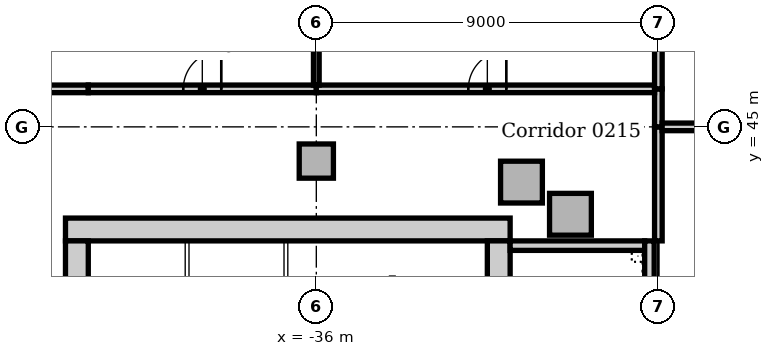
"""IFC4 building model, lengths in metres.
Left out: names, types, materials, properties, quantities, classifications, styles, units other than length and angle.
Written with IfcOpenShell. Run it as: python <this file> out.ifc"""

import sys

from ifc_helpers import new_model, si_unit, direction, frame, frame_2d, origin, origin_2d, place, context, subcontext, project, spatial, rectangle, extrude, element, fill, save


model = new_model("IFC4")
c1 = context("Model", 3, precision=1e-05, world=origin(), true_north=direction((0.0, 1.0)))
c2 = subcontext(c1, "Body", "Model", "MODEL_VIEW")
j1 = project(units=[si_unit("LENGTHUNIT", "METRE"), si_unit("PLANEANGLEUNIT", "RADIAN")], contexts=[c1])
p1 = place(None, origin())
s1 = spatial("IfcSite", under=j1, at=p1, CompositionType="ELEMENT")
p2 = place(p1, origin())
s2 = spatial("IfcBuilding", under=s1, at=p2, CompositionType="ELEMENT")
p3 = place(p2, frame((0.0, 0.0, 11.0)))
s3 = spatial("IfcBuildingStorey", under=s2, at=p3, CompositionType="ELEMENT", Elevation=11.0)
p4 = place(p3, frame((-30.9, 42.3, 0.0), z_axis=(0.0, 0.0, 1.0), x_axis=(-1.0, 0.0, 0.0)))
e1 = element("IfcWall", 1, at=p4, inside=s3, PredefinedType="SOLIDWALL", context=c2, shape_type="SweptSolid", body=[
    extrude(rectangle(XDim=11.7, YDim=0.6, at=frame_2d((5.85, 0.0))), origin(), (0.0, 0.0, 1.0), 5.0),
])
p5 = place(p3, frame((-31.2, 30.5, 0.0), z_axis=(0.0, 0.0, 1.0), x_axis=(0.0, 1.0, 0.0)))
e2 = element("IfcWall", 2, at=p5, inside=s3, PredefinedType="SOLIDWALL", context=c2, shape_type="SweptSolid", body=[
    extrude(rectangle(XDim=11.5, YDim=0.6, at=frame_2d((5.75, 0.0))), origin(), (0.0, 0.0, 1.0), 5.0),
])
p6 = place(p5, frame((0.85, 0.0, 0.0)))
e3 = element("IfcOpeningElement", 3, at=p6, cuts=e2, PredefinedType="OPENING", context=c2, shape_type="SweptSolid", body=[
    extrude(rectangle(XDim=1.8, YDim=2.1, at=frame_2d((0.9, 1.05))), frame((0.0, 0.31, 0.0), z_axis=(0.0, -1.0, 0.0), x_axis=(1.0, 0.0, 0.0)), (0.0, 0.0, 1.0), 0.62),
])
p7 = place(p3, frame((-42.3, 42.0, 0.0), z_axis=(0.0, 0.0, 1.0), x_axis=(0.0, -1.0, 0.0)))
e4 = element("IfcWall", 4, at=p7, inside=s3, PredefinedType="SOLIDWALL", context=c2, shape_type="SweptSolid", body=[
    extrude(rectangle(XDim=11.5, YDim=0.6, at=frame_2d((5.75, 0.0))), origin(), (0.0, 0.0, 1.0), 5.0),
])
p8 = place(p7, frame((8.85, 0.0, 0.0)))
e5 = element("IfcOpeningElement", 5, at=p8, cuts=e4, PredefinedType="OPENING", context=c2, shape_type="SweptSolid", body=[
    extrude(rectangle(XDim=1.8, YDim=2.1, at=frame_2d((0.9, 1.05))), frame((0.0, 0.31, 0.0), z_axis=(0.0, -1.0, 0.0), x_axis=(1.0, 0.0, 0.0)), (0.0, 0.0, 1.0), 0.62),
])
p9 = place(p3, frame((-27.36, 41.875, 0.0), z_axis=(0.0, 0.0, 1.0), x_axis=(-1.0, 0.0, 0.0)))
e6 = element("IfcWall", 6, at=p9, inside=s3, PredefinedType="SOLIDWALL", context=c2, shape_type="SweptSolid", body=[
    extrude(rectangle(XDim=3.54, YDim=0.25, at=frame_2d((1.77, 0.0))), origin(), (0.0, 0.0, 1.0), 5.0),
])
p10 = place(p3, frame((-27.235, 35.35, 0.0), z_axis=(0.0, 0.0, 1.0), x_axis=(0.0, 1.0, 0.0)))
e7 = element("IfcWall", 7, at=p10, inside=s3, PredefinedType="SOLIDWALL", context=c2, shape_type="SweptSolid", body=[
    extrude(rectangle(XDim=6.65, YDim=0.25, at=frame_2d((3.325, 0.0))), origin(), (0.0, 0.0, 1.0), 5.0),
])
for number, where, z_axis, x_axis in (
    (8, (-29.313, 42.7, 0.0), (0.0, 0.0, 1.0), (1.0, 0.0, 0.0)),
    (9, (-30.602, 43.547, 0.0), (0.0, 0.0, 1.0), (1.0, 0.0, 0.0)),
):
    element("IfcColumn", number, at=place(p3, frame(where, z_axis=z_axis, x_axis=x_axis)), inside=s3, PredefinedType="COLUMN", context=c2, shape_type="SweptSolid", body=[
        extrude(rectangle(XDim=1.1, YDim=1.1, at=origin_2d()), origin(), (0.0, 0.0, 1.0), 4.7),
    ])
p11 = place(p3, frame((-36.0, 44.1, 0.0), z_axis=(0.0, 0.0, 1.0), x_axis=(1.0, 0.0, 0.0)))
e10 = element("IfcColumn", 10, at=p11, inside=s3, PredefinedType="COLUMN", context=c2, shape_type="SweptSolid", body=[
    extrude(rectangle(XDim=0.9, YDim=0.9, at=origin_2d()), origin(), (0.0, 0.0, 1.0), 4.7),
])
p12 = place(p3, frame((-44.9, 46.0, 0.0), z_axis=(0.0, 0.0, 1.0), x_axis=(1.0, 0.0, 0.0)))
e11 = element("IfcWall", 11, at=p12, inside=s3, PredefinedType="PARTITIONING", context=c2, shape_type="SweptSolid", body=[
    extrude(rectangle(XDim=2.9, YDim=0.2, at=frame_2d((1.45, 0.0))), origin(), (0.0, 0.0, 1.0), 4.7),
])
p13 = place(p3, frame((-27.0, 42.0, 0.0), z_axis=(0.0, 0.0, 1.0), x_axis=(0.0, 1.0, 0.0)))
e12 = element("IfcWall", 12, at=p13, inside=s3, PredefinedType="PARTITIONING", context=c2, shape_type="SweptSolid", body=[
    extrude(rectangle(XDim=3.0, YDim=0.2, at=frame_2d((1.5, 0.0))), origin(), (0.0, 0.0, 1.0), 4.7),
])
p14 = place(p3, frame((-27.0, 45.0, 0.0), z_axis=(0.0, 0.0, 1.0), x_axis=(0.0, 1.0, 0.0)))
e13 = element("IfcWall", 13, at=p14, inside=s3, PredefinedType="PARTITIONING", context=c2, shape_type="SweptSolid", body=[
    extrude(rectangle(XDim=1.0, YDim=0.2, at=frame_2d((0.5, 0.0))), origin(), (0.0, 0.0, 1.0), 4.7),
])
p15 = place(p3, frame((-42.0, 46.0, 0.0), z_axis=(0.0, 0.0, 1.0), x_axis=(1.0, 0.0, 0.0)))
e14 = element("IfcWall", 14, at=p15, inside=s3, PredefinedType="PARTITIONING", context=c2, shape_type="SweptSolid", body=[
    extrude(rectangle(XDim=6.0, YDim=0.2, at=frame_2d((3.0, 0.0))), origin(), (0.0, 0.0, 1.0), 4.7),
])
p16 = place(p15, frame((2.5, 0.0, 0.0)))
e15 = element("IfcOpeningElement", 15, at=p16, cuts=e14, PredefinedType="OPENING", context=c2, shape_type="SweptSolid", body=[
    extrude(rectangle(XDim=1.0, YDim=2.1, at=frame_2d((0.5, 1.05))), frame((0.0, 0.11, 0.0), z_axis=(0.0, -1.0, 0.0), x_axis=(1.0, 0.0, 0.0)), (0.0, 0.0, 1.0), 0.22),
])
p17 = place(p3, frame((-36.0, 46.0, 0.0), z_axis=(0.0, 0.0, 1.0), x_axis=(1.0, 0.0, 0.0)))
e16 = element("IfcWall", 16, at=p17, inside=s3, PredefinedType="PARTITIONING", context=c2, shape_type="SweptSolid", body=[
    extrude(rectangle(XDim=8.9, YDim=0.2, at=frame_2d((4.45, 0.0))), origin(), (0.0, 0.0, 1.0), 4.7),
])
p18 = place(p17, frame((4.0, 0.0, 0.0)))
e17 = element("IfcOpeningElement", 17, at=p18, cuts=e16, PredefinedType="OPENING", context=c2, shape_type="SweptSolid", body=[
    extrude(rectangle(XDim=1.0, YDim=2.1, at=frame_2d((0.5, 1.05))), frame((0.0, 0.11, 0.0), z_axis=(0.0, -1.0, 0.0), x_axis=(1.0, 0.0, 0.0)), (0.0, 0.0, 1.0), 0.22),
])
p19 = place(p3, frame((-26.9, 45.0, 0.0), z_axis=(0.0, 0.0, 1.0), x_axis=(1.0, 0.0, 0.0)))
e18 = element("IfcWall", 18, at=p19, inside=s3, PredefinedType="PARTITIONING", context=c2, shape_type="SweptSolid", body=[
    extrude(rectangle(XDim=8.43, YDim=0.2, at=frame_2d((4.215, 0.0))), origin(), (0.0, 0.0, 1.0), 4.7),
])
p20 = place(p3, frame((-27.0, 46.0, 0.0), z_axis=(0.0, 0.0, 1.0), x_axis=(0.0, 1.0, 0.0)))
e19 = element("IfcWall", 19, at=p20, inside=s3, PredefinedType="PARTITIONING", context=c2, shape_type="SweptSolid", body=[
    extrude(rectangle(XDim=4.0, YDim=0.2, at=frame_2d((2.0, 0.0))), origin(), (0.0, 0.0, 1.0), 4.7),
])
p21 = place(p3, frame((-36.0, 46.1, 0.0), z_axis=(0.0, 0.0, 1.0), x_axis=(0.0, 1.0, 0.0)))
e20 = element("IfcWall", 20, at=p21, inside=s3, PredefinedType="PARTITIONING", context=c2, shape_type="SweptSolid", body=[
    extrude(rectangle(XDim=7.43, YDim=0.15, at=frame_2d((3.715, 0.0))), origin(), (0.0, 0.0, 1.0), 4.7),
])
p22 = place(p3, frame((-34.0, 41.075, 0.0), z_axis=(0.0, 0.0, 1.0), x_axis=(0.0, -1.0, 0.0)))
e21 = element("IfcWall", 21, at=p22, inside=s3, PredefinedType="SOLIDWALL", context=c2, shape_type="SweptSolid", body=[
    extrude(rectangle(XDim=7.0, YDim=0.15, at=frame_2d((3.5, 0.0))), origin(), (0.0, 0.0, 1.0), 5.0),
])
for number, where, z_axis, x_axis in (
    (22, (-39.4, 34.075, 0.0), (0.0, 0.0, 1.0), (0.0, 1.0, 0.0)),
    (23, (-36.8, 34.075, 0.0), (0.0, 0.0, 1.0), (0.0, 1.0, 0.0)),
):
    element("IfcWall", number, at=place(p3, frame(where, z_axis=z_axis, x_axis=x_axis)), inside=s3, PredefinedType="PARTITIONING", context=c2, shape_type="SweptSolid", body=[
        extrude(rectangle(XDim=7.925, YDim=0.1, at=frame_2d((3.962, 0.0))), origin(), (0.0, 0.0, 1.0), 4.7),
    ])
p23 = place(p16, origin())
e24 = element("IfcDoor", 24, at=p23, inside=s3, OperationType="SINGLE_SWING_RIGHT", PredefinedType="DOOR", context=c2, shape_type="SweptSolid", body=[
    extrude(rectangle(XDim=1.0, YDim=2.1, at=frame_2d((0.5, 1.05))), frame((0.0, 0.025, 0.0), z_axis=(0.0, -1.0, 0.0), x_axis=(1.0, 0.0, 0.0)), (0.0, 0.0, 1.0), 0.05),
])
fill(e15, e24)
p24 = place(p18, origin())
e25 = element("IfcDoor", 25, at=p24, inside=s3, OperationType="SINGLE_SWING_RIGHT", PredefinedType="DOOR", context=c2, shape_type="SweptSolid", body=[
    extrude(rectangle(XDim=1.0, YDim=2.1, at=frame_2d((0.5, 1.05))), frame((0.0, 0.025, 0.0), z_axis=(0.0, -1.0, 0.0), x_axis=(1.0, 0.0, 0.0)), (0.0, 0.0, 1.0), 0.05),
])
fill(e17, e25)
save(model, sys.argv[1])
